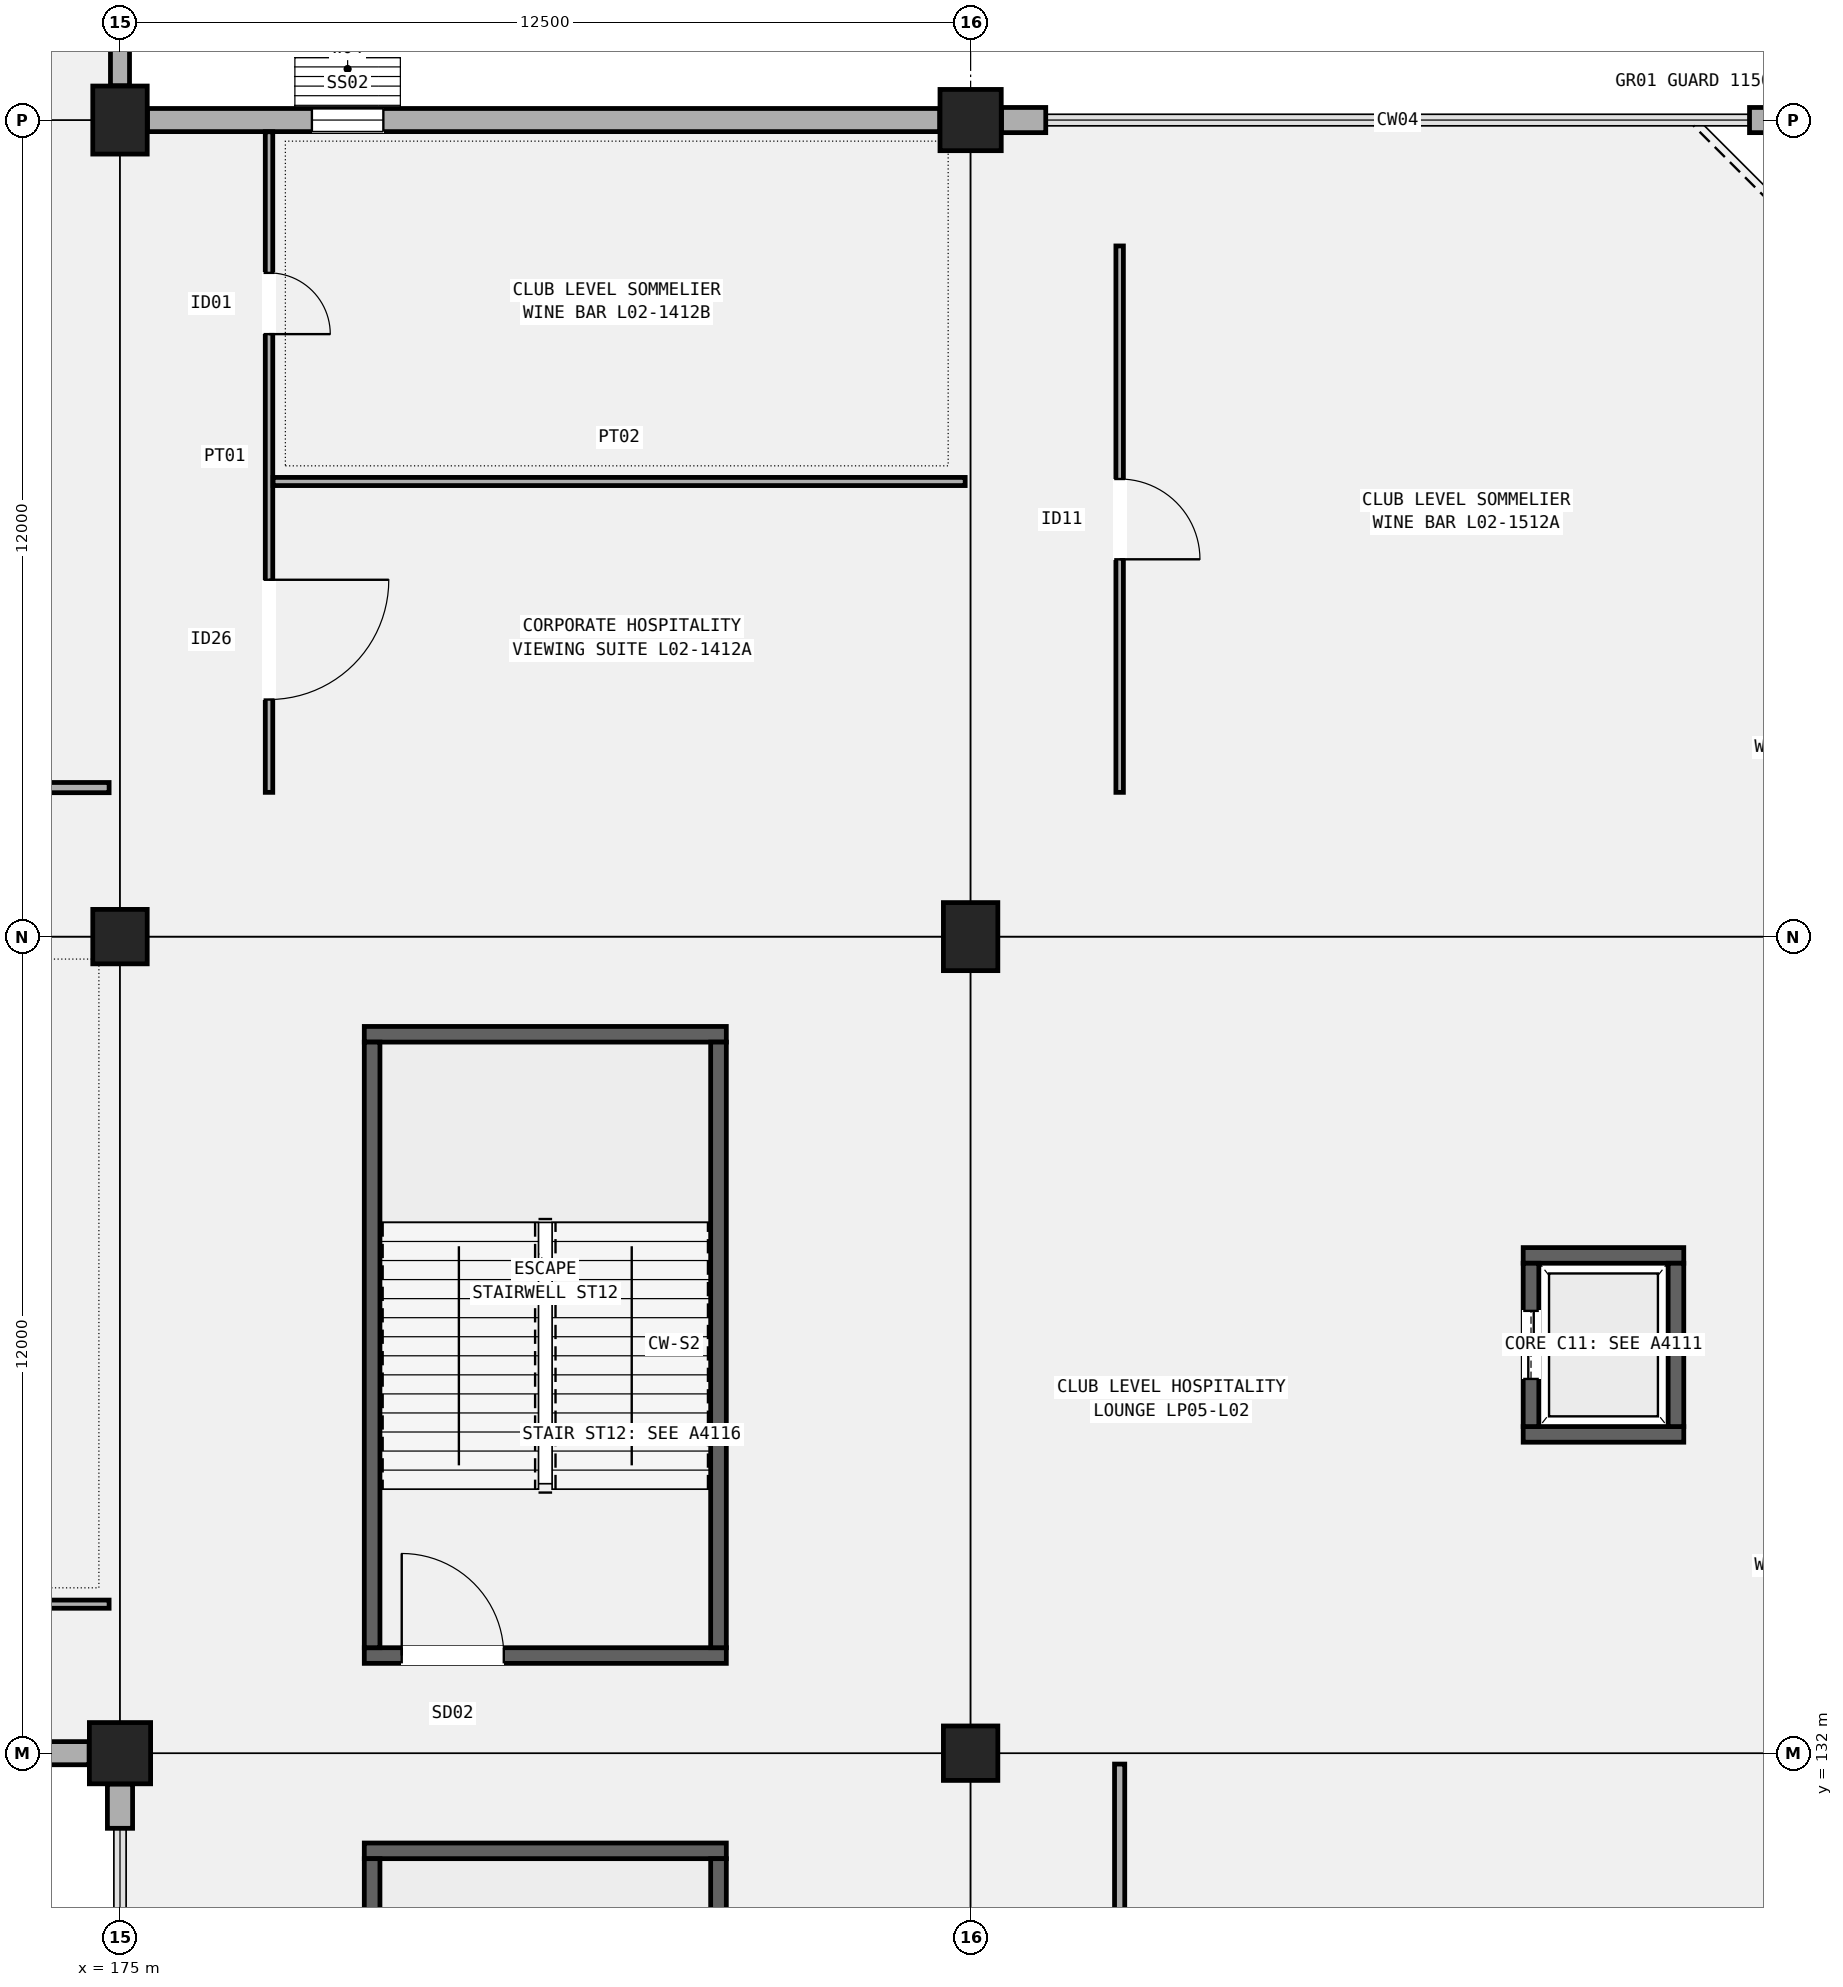
"""IFC4 building model, lengths in metres.
Left out: names, types, materials, properties, quantities, classifications, styles, units other than length and angle.
Written with IfcOpenShell. Run it as: python <this file> out.ifc"""

import sys

from ifc_helpers import new_model, si_unit, direction, frame, frame_2d, origin, origin_2d, place, context, subcontext, project, spatial, rectangle, extrude, element, fill, save


model = new_model("IFC4")
c1 = context("Model", 3, precision=1e-05, world=origin(), true_north=direction((0.0, 1.0)))
c2 = subcontext(c1, "Body", "Model", "MODEL_VIEW")
j1 = project(units=[si_unit("LENGTHUNIT", "METRE"), si_unit("PLANEANGLEUNIT", "RADIAN")], contexts=[c1])
p1 = place(None, origin())
s1 = spatial("IfcSite", under=j1, at=p1, CompositionType="ELEMENT")
p2 = place(p1, origin())
s2 = spatial("IfcBuilding", under=s1, at=p2, CompositionType="ELEMENT")
p3 = place(p2, frame((0.0, 0.0, 10.2)))
s3 = spatial("IfcBuildingStorey", under=s2, at=p3, CompositionType="ELEMENT", Elevation=10.2)
p4 = place(p3, frame((175.0, 132.0, 0.0), z_axis=(0.0, 0.0, 1.0), x_axis=(1.0, 0.0, 0.0)))
e1 = element("IfcColumn", 1, at=p4, inside=s3, PredefinedType="COLUMN", context=c2, shape_type="SweptSolid", body=[
    extrude(rectangle(XDim=0.9, YDim=0.9, at=origin_2d()), origin(), (0.0, 0.0, 1.0), 5.1),
])
p5 = place(p3, frame((175.0, 144.0, 0.0), z_axis=(0.0, 0.0, 1.0), x_axis=(1.0, 0.0, 0.0)))
e2 = element("IfcColumn", 2, at=p5, inside=s3, PredefinedType="COLUMN", context=c2, shape_type="SweptSolid", body=[
    extrude(rectangle(XDim=0.8, YDim=0.8, at=origin_2d()), origin(), (0.0, 0.0, 1.0), 5.1),
])
p6 = place(p3, frame((175.0, 156.0, 0.0), z_axis=(0.0, 0.0, 1.0), x_axis=(1.0, 0.0, 0.0)))
e3 = element("IfcColumn", 3, at=p6, inside=s3, PredefinedType="COLUMN", context=c2, shape_type="SweptSolid", body=[
    extrude(rectangle(XDim=0.8, YDim=1.0, at=origin_2d()), origin(), (0.0, 0.0, 1.0), 5.1),
])
p7 = place(p3, frame((187.5, 132.0, 0.0), z_axis=(0.0, 0.0, 1.0), x_axis=(1.0, 0.0, 0.0)))
e4 = element("IfcColumn", 4, at=p7, inside=s3, PredefinedType="COLUMN", context=c2, shape_type="SweptSolid", body=[
    extrude(rectangle(XDim=0.8, YDim=0.8, at=origin_2d()), origin(), (0.0, 0.0, 1.0), 5.1),
])
p8 = place(p3, frame((187.5, 144.0, 0.0), z_axis=(0.0, 0.0, 1.0), x_axis=(1.0, 0.0, 0.0)))
e5 = element("IfcColumn", 5, at=p8, inside=s3, PredefinedType="COLUMN", context=c2, shape_type="SweptSolid", body=[
    extrude(rectangle(XDim=0.8, YDim=1.0, at=origin_2d()), origin(), (0.0, 0.0, 1.0), 5.1),
])
p9 = place(p3, frame((187.5, 156.0, 0.0), z_axis=(0.0, 0.0, 1.0), x_axis=(1.0, 0.0, 0.0)))
e6 = element("IfcColumn", 6, at=p9, inside=s3, PredefinedType="COLUMN", context=c2, shape_type="SweptSolid", body=[
    extrude(rectangle(XDim=0.9, YDim=0.9, at=origin_2d()), origin(), (0.0, 0.0, 1.0), 5.1),
])
p10 = place(p3, frame((162.904, 132.0, 0.0), z_axis=(0.0, 0.0, 1.0), x_axis=(1.0, 0.0, 0.0)))
e7 = element("IfcWall", 7, at=p10, inside=s3, PredefinedType="SOLIDWALL", context=c2, shape_type="SweptSolid", body=[
    extrude(rectangle(XDim=11.642, YDim=0.34, at=frame_2d((5.821, 0.0))), origin(), (0.0, 0.0, 1.0), 4.02),
])
p11 = place(p10, frame((1.5, 0.0, 0.95)))
e8 = element("IfcOpeningElement", 8, at=p11, cuts=e7, PredefinedType="OPENING", context=c2, shape_type="SweptSolid", body=[
    extrude(rectangle(XDim=3.3, YDim=2.25, at=frame_2d((1.65, 1.125))), frame((0.0, 0.18, 0.0), z_axis=(0.0, -1.0, 0.0), x_axis=(1.0, 0.0, 0.0)), (0.0, 0.0, 1.0), 0.36),
])
p12 = place(p3, frame((175.0, 156.504, 0.0), z_axis=(0.0, 0.0, 1.0), x_axis=(0.0, 1.0, 0.0)))
e9 = element("IfcWall", 9, at=p12, inside=s3, PredefinedType="SOLIDWALL", context=c2, shape_type="SweptSolid", body=[
    extrude(rectangle(XDim=11.042, YDim=0.28, at=frame_2d((5.521, 0.0))), origin(), (0.0, 0.0, 1.0), 4.02),
])
p13 = place(p12, frame((2.316, 0.0, 0.95)))
e10 = element("IfcOpeningElement", 10, at=p13, cuts=e9, PredefinedType="OPENING", context=c2, shape_type="SweptSolid", body=[
    extrude(rectangle(XDim=3.6, YDim=1.75, at=frame_2d((1.8, 0.875))), frame((0.0, 0.15, 0.0), z_axis=(0.0, -1.0, 0.0), x_axis=(1.0, 0.0, 0.0)), (0.0, 0.0, 1.0), 0.3),
])
p14 = place(p3, frame((175.0, 130.896, 0.0), z_axis=(0.0, 0.0, 1.0), x_axis=(0.0, 1.0, 0.0)))
e11 = element("IfcWall", 11, at=p14, inside=s3, PredefinedType="SOLIDWALL", context=c2, shape_type="SweptSolid", body=[
    extrude(rectangle(XDim=0.65, YDim=0.37, at=frame_2d((0.325, 0.0))), origin(), (0.0, 0.0, 1.0), 4.02),
])
p15 = place(p3, frame((175.404, 156.0, 0.0), z_axis=(0.0, 0.0, 1.0), x_axis=(1.0, 0.0, 0.0)))
e12 = element("IfcWall", 12, at=p15, inside=s3, PredefinedType="SOLIDWALL", context=c2, shape_type="SweptSolid", body=[
    extrude(rectangle(XDim=11.642, YDim=0.34, at=frame_2d((5.821, 0.0))), origin(), (0.0, 0.0, 1.0), 4.02),
])
p16 = place(p15, frame((2.416, 0.0, 0.95)))
e13 = element("IfcOpeningElement", 13, at=p16, cuts=e12, PredefinedType="OPENING", context=c2, shape_type="SweptSolid", body=[
    extrude(rectangle(XDim=1.05, YDim=2.2, at=frame_2d((0.525, 1.1))), frame((0.0, 0.18, 0.0), z_axis=(0.0, -1.0, 0.0), x_axis=(1.0, 0.0, 0.0)), (0.0, 0.0, 1.0), 0.36),
])
for number, where, z_axis, x_axis in (
    (14, (187.954, 156.0, 0.0), (0.0, 0.0, 1.0), (1.0, 0.0, 0.0)),
    (15, (198.946, 156.0, 0.0), (0.0, 0.0, 1.0), (1.0, 0.0, 0.0)),
):
    element("IfcWall", number, at=place(p3, frame(where, z_axis=z_axis, x_axis=x_axis)), inside=s3, PredefinedType="SOLIDWALL", context=c2, shape_type="SweptSolid", body=[
        extrude(rectangle(XDim=0.65, YDim=0.37, at=frame_2d((0.325, 0.0))), origin(), (0.0, 0.0, 1.0), 4.12),
    ])
p17 = place(p3, frame((178.59, 133.435, 0.0), z_axis=(0.0, 0.0, 1.0), x_axis=(1.0, 0.0, 0.0)))
e16 = element("IfcWall", 16, at=p17, inside=s3, PredefinedType="SHEAR", context=c2, shape_type="SweptSolid", body=[
    extrude(rectangle(XDim=5.32, YDim=0.23, at=frame_2d((2.66, 0.0))), origin(), (0.0, 0.0, 1.0), 4.82),
])
p18 = place(p17, frame((0.55, 0.0, 0.0)))
e17 = element("IfcOpeningElement", 17, at=p18, cuts=e16, PredefinedType="OPENING", context=c2, shape_type="SweptSolid", body=[
    extrude(rectangle(XDim=1.5, YDim=2.2, at=frame_2d((0.75, 1.1))), frame((0.0, 0.125, 0.0), z_axis=(0.0, -1.0, 0.0), x_axis=(1.0, 0.0, 0.0)), (0.0, 0.0, 1.0), 0.25),
])
p19 = place(p3, frame((178.59, 142.565, 0.0), z_axis=(0.0, 0.0, 1.0), x_axis=(1.0, 0.0, 0.0)))
e18 = element("IfcWall", 18, at=p19, inside=s3, PredefinedType="SHEAR", context=c2, shape_type="SweptSolid", body=[
    extrude(rectangle(XDim=5.32, YDim=0.23, at=frame_2d((2.66, 0.0))), origin(), (0.0, 0.0, 1.0), 4.82),
])
for number, where, z_axis, x_axis in (
    (19, (178.705, 133.55, 0.0), (0.0, 0.0, 1.0), (0.0, 1.0, 0.0)),
    (20, (183.795, 133.55, 0.0), (0.0, 0.0, 1.0), (0.0, 1.0, 0.0)),
):
    element("IfcWall", number, at=place(p3, frame(where, z_axis=z_axis, x_axis=x_axis)), inside=s3, PredefinedType="SHEAR", context=c2, shape_type="SweptSolid", body=[
        extrude(rectangle(XDim=8.9, YDim=0.23, at=frame_2d((4.45, 0.0))), origin(), (0.0, 0.0, 1.0), 4.82),
    ])
p20 = place(p3, frame((178.59, 130.565, 0.0), z_axis=(0.0, 0.0, 1.0), x_axis=(1.0, 0.0, 0.0)))
e21 = element("IfcWall", 21, at=p20, inside=s3, PredefinedType="SHEAR", context=c2, shape_type="SweptSolid", body=[
    extrude(rectangle(XDim=5.32, YDim=0.23, at=frame_2d((2.66, 0.0))), origin(), (0.0, 0.0, 1.0), 4.82),
])
for number, where, z_axis, x_axis in (
    (22, (178.705, 121.55, 0.0), (0.0, 0.0, 1.0), (0.0, 1.0, 0.0)),
    (23, (183.795, 121.55, 0.0), (0.0, 0.0, 1.0), (0.0, 1.0, 0.0)),
):
    element("IfcWall", number, at=place(p3, frame(where, z_axis=z_axis, x_axis=x_axis)), inside=s3, PredefinedType="SHEAR", context=c2, shape_type="SweptSolid", body=[
        extrude(rectangle(XDim=8.9, YDim=0.23, at=frame_2d((4.45, 0.0))), origin(), (0.0, 0.0, 1.0), 4.82),
    ])
for number, where, z_axis, x_axis in (
    (24, (195.62, 136.685, 0.0), (0.0, 0.0, 1.0), (1.0, 0.0, 0.0)),
    (25, (195.62, 139.315, 0.0), (0.0, 0.0, 1.0), (1.0, 0.0, 0.0)),
):
    element("IfcWall", number, at=place(p3, frame(where, z_axis=z_axis, x_axis=x_axis)), inside=s3, PredefinedType="SHEAR", context=c2, shape_type="SweptSolid", body=[
        extrude(rectangle(XDim=2.36, YDim=0.23, at=frame_2d((1.18, 0.0))), origin(), (0.0, 0.0, 1.0), 4.82),
    ])
p21 = place(p3, frame((195.735, 136.8, 0.0), z_axis=(0.0, 0.0, 1.0), x_axis=(0.0, 1.0, 0.0)))
e26 = element("IfcWall", 26, at=p21, inside=s3, PredefinedType="SHEAR", context=c2, shape_type="SweptSolid", body=[
    extrude(rectangle(XDim=2.4, YDim=0.23, at=frame_2d((1.2, 0.0))), origin(), (0.0, 0.0, 1.0), 4.82),
])
p22 = place(p21, frame((0.7, 0.0, 0.0)))
e27 = element("IfcOpeningElement", 27, at=p22, cuts=e26, PredefinedType="OPENING", context=c2, shape_type="SweptSolid", body=[
    extrude(rectangle(XDim=1.0, YDim=2.15, at=frame_2d((0.5, 1.075))), frame((0.0, 0.125, 0.0), z_axis=(0.0, -1.0, 0.0), x_axis=(1.0, 0.0, 0.0)), (0.0, 0.0, 1.0), 0.25),
])
p23 = place(p3, frame((197.865, 136.8, 0.0), z_axis=(0.0, 0.0, 1.0), x_axis=(0.0, 1.0, 0.0)))
e28 = element("IfcWall", 28, at=p23, inside=s3, PredefinedType="SHEAR", context=c2, shape_type="SweptSolid", body=[
    extrude(rectangle(XDim=2.4, YDim=0.23, at=frame_2d((1.2, 0.0))), origin(), (0.0, 0.0, 1.0), 4.82),
])
p24 = place(p3, frame((162.66, 134.19, 0.0), z_axis=(0.0, 0.0, 1.0), x_axis=(1.0, 0.0, 0.0)))
e29 = element("IfcWall", 29, at=p24, inside=s3, PredefinedType="PARTITIONING", context=c2, shape_type="SweptSolid", body=[
    extrude(rectangle(XDim=12.18, YDim=0.12, at=frame_2d((6.09, 0.0))), origin(), (0.0, 0.0, 1.0), 4.22),
])
p25 = place(p24, frame((5.47, 0.0, 0.0)))
e30 = element("IfcOpeningElement", 30, at=p25, cuts=e29, PredefinedType="OPENING", context=c2, shape_type="SweptSolid", body=[
    extrude(rectangle(XDim=1.24, YDim=2.22, at=frame_2d((0.62, 1.11))), frame((0.0, 0.07, 0.0), z_axis=(0.0, -1.0, 0.0), x_axis=(1.0, 0.0, 0.0)), (0.0, 0.0, 1.0), 0.14),
])
p26 = place(p3, frame((162.66, 146.19, 0.0), z_axis=(0.0, 0.0, 1.0), x_axis=(1.0, 0.0, 0.0)))
e31 = element("IfcWall", 31, at=p26, inside=s3, PredefinedType="PARTITIONING", context=c2, shape_type="SweptSolid", body=[
    extrude(rectangle(XDim=12.18, YDim=0.15, at=frame_2d((6.09, 0.0))), origin(), (0.0, 0.0, 1.0), 4.22),
])
p27 = place(p26, frame((5.455, 0.0, 0.0)))
e32 = element("IfcOpeningElement", 32, at=p27, cuts=e31, PredefinedType="OPENING", context=c2, shape_type="SweptSolid", body=[
    extrude(rectangle(XDim=1.27, YDim=2.2, at=frame_2d((0.635, 1.1))), frame((0.0, 0.085, 0.0), z_axis=(0.0, -1.0, 0.0), x_axis=(1.0, 0.0, 0.0)), (0.0, 0.0, 1.0), 0.17),
])
p28 = place(p3, frame((177.19, 146.12, 0.0), z_axis=(0.0, 0.0, 1.0), x_axis=(0.0, 1.0, 0.0)))
e33 = element("IfcWall", 33, at=p28, inside=s3, PredefinedType="PARTITIONING", context=c2, shape_type="SweptSolid", body=[
    extrude(rectangle(XDim=9.708, YDim=0.11, at=frame_2d((4.854, 0.0))), origin(), (0.0, 0.0, 1.0), 4.22),
])
p29 = place(p28, frame((3.124, 0.0, 0.0), z_axis=(0.0, 0.0, 1.0), x_axis=(-1.0, 0.0, 0.0)))
e34 = element("IfcOpeningElement", 34, at=p29, cuts=e33, PredefinedType="OPENING", context=c2, shape_type="SweptSolid", body=[
    extrude(rectangle(XDim=1.76, YDim=2.3, at=frame_2d((0.88, 1.15))), frame((0.0, 0.065, 0.0), z_axis=(0.0, -1.0, 0.0), x_axis=(1.0, 0.0, 0.0)), (0.0, 0.0, 1.0), 0.13),
])
p30 = place(p28, frame((7.634, 0.0, 0.0), z_axis=(0.0, 0.0, 1.0), x_axis=(-1.0, 0.0, 0.0)))
e35 = element("IfcOpeningElement", 35, at=p30, cuts=e33, PredefinedType="OPENING", context=c2, shape_type="SweptSolid", body=[
    extrude(rectangle(XDim=0.9, YDim=2.06, at=frame_2d((0.45, 1.03))), frame((0.0, 0.065, 0.0), z_axis=(0.0, -1.0, 0.0), x_axis=(1.0, 0.0, 0.0)), (0.0, 0.0, 1.0), 0.13),
])
p31 = place(p3, frame((177.25, 150.688, 0.0), z_axis=(0.0, 0.0, 1.0), x_axis=(1.0, 0.0, 0.0)))
e36 = element("IfcWall", 36, at=p31, inside=s3, PredefinedType="PARTITIONING", context=c2, shape_type="SweptSolid", body=[
    extrude(rectangle(XDim=10.17, YDim=0.12, at=frame_2d((5.085, 0.0))), origin(), (0.0, 0.0, 1.0), 4.22),
])
p32 = place(p3, frame((189.69, 120.16, 0.0), z_axis=(0.0, 0.0, 1.0), x_axis=(0.0, 1.0, 0.0)))
e37 = element("IfcWall", 37, at=p32, inside=s3, PredefinedType="PARTITIONING", context=c2, shape_type="SweptSolid", body=[
    extrude(rectangle(XDim=11.68, YDim=0.15, at=frame_2d((5.84, 0.0))), origin(), (0.0, 0.0, 1.0), 4.22),
])
p33 = place(p32, frame((6.415, 0.0, 0.0), z_axis=(0.0, 0.0, 1.0), x_axis=(-1.0, 0.0, 0.0)))
e38 = element("IfcOpeningElement", 38, at=p33, cuts=e37, PredefinedType="OPENING", context=c2, shape_type="SweptSolid", body=[
    extrude(rectangle(XDim=1.15, YDim=2.15, at=frame_2d((0.575, 1.075))), frame((0.0, 0.085, 0.0), z_axis=(0.0, -1.0, 0.0), x_axis=(1.0, 0.0, 0.0)), (0.0, 0.0, 1.0), 0.17),
])
p34 = place(p3, frame((189.69, 146.12, 0.0), z_axis=(0.0, 0.0, 1.0), x_axis=(0.0, 1.0, 0.0)))
e39 = element("IfcWall", 39, at=p34, inside=s3, PredefinedType="PARTITIONING", context=c2, shape_type="SweptSolid", body=[
    extrude(rectangle(XDim=8.03, YDim=0.11, at=frame_2d((4.015, 0.0))), origin(), (0.0, 0.0, 1.0), 4.22),
])
p35 = place(p34, frame((4.605, 0.0, 0.0), z_axis=(0.0, 0.0, 1.0), x_axis=(-1.0, 0.0, 0.0)))
e40 = element("IfcOpeningElement", 40, at=p35, cuts=e39, PredefinedType="OPENING", context=c2, shape_type="SweptSolid", body=[
    extrude(rectangle(XDim=1.18, YDim=2.2, at=frame_2d((0.59, 1.1))), frame((0.0, 0.065, 0.0), z_axis=(0.0, -1.0, 0.0), x_axis=(1.0, 0.0, 0.0)), (0.0, 0.0, 1.0), 0.13),
])
p36 = place(p16, origin())
e41 = element("IfcWindow", 41, at=p36, inside=s3, PartitioningType="SINGLE_PANEL", PredefinedType="WINDOW", context=c2, shape_type="SweptSolid", body=[
    extrude(rectangle(XDim=1.05, YDim=2.2, at=frame_2d((0.525, 1.1))), frame((0.0, 0.03, 0.0), z_axis=(0.0, -1.0, 0.0), x_axis=(1.0, 0.0, 0.0)), (0.0, 0.0, 1.0), 0.06),
])
fill(e13, e41)
p37 = place(p18, origin())
e42 = element("IfcDoor", 42, at=p37, inside=s3, OperationType="SINGLE_SWING_LEFT", PredefinedType="DOOR", context=c2, shape_type="SweptSolid", body=[
    extrude(rectangle(XDim=1.5, YDim=2.2, at=frame_2d((0.75, 1.1))), frame((0.0, 0.025, 0.0), z_axis=(0.0, -1.0, 0.0), x_axis=(1.0, 0.0, 0.0)), (0.0, 0.0, 1.0), 0.05),
])
fill(e17, e42)
p38 = place(p22, origin())
e43 = element("IfcDoor", 43, at=p38, inside=s3, OperationType="DOUBLE_DOOR_SLIDING", PredefinedType="DOOR", context=c2, shape_type="SweptSolid", body=[
    extrude(rectangle(XDim=1.0, YDim=2.15, at=frame_2d((0.5, 1.075))), frame((0.0, 0.025, 0.0), z_axis=(0.0, -1.0, 0.0), x_axis=(1.0, 0.0, 0.0)), (0.0, 0.0, 1.0), 0.05),
])
fill(e27, e43)
p39 = place(p29, origin())
e44 = element("IfcDoor", 44, at=p39, inside=s3, OperationType="SINGLE_SWING_LEFT", PredefinedType="DOOR", context=c2, shape_type="SweptSolid", body=[
    extrude(rectangle(XDim=1.76, YDim=2.3, at=frame_2d((0.88, 1.15))), frame((0.0, 0.025, 0.0), z_axis=(0.0, -1.0, 0.0), x_axis=(1.0, 0.0, 0.0)), (0.0, 0.0, 1.0), 0.05),
])
fill(e34, e44)
p40 = place(p30, origin())
e45 = element("IfcDoor", 45, at=p40, inside=s3, OperationType="SINGLE_SWING_RIGHT", PredefinedType="DOOR", context=c2, shape_type="SweptSolid", body=[
    extrude(rectangle(XDim=0.9, YDim=2.06, at=frame_2d((0.45, 1.03))), frame((0.0, 0.025, 0.0), z_axis=(0.0, -1.0, 0.0), x_axis=(1.0, 0.0, 0.0)), (0.0, 0.0, 1.0), 0.05),
])
fill(e35, e45)
p41 = place(p35, origin())
e46 = element("IfcDoor", 46, at=p41, inside=s3, OperationType="SINGLE_SWING_RIGHT", PredefinedType="DOOR", context=c2, shape_type="SweptSolid", body=[
    extrude(rectangle(XDim=1.18, YDim=2.2, at=frame_2d((0.59, 1.1))), frame((0.0, 0.025, 0.0), z_axis=(0.0, -1.0, 0.0), x_axis=(1.0, 0.0, 0.0)), (0.0, 0.0, 1.0), 0.05),
])
fill(e40, e46)
save(model, sys.argv[1])
